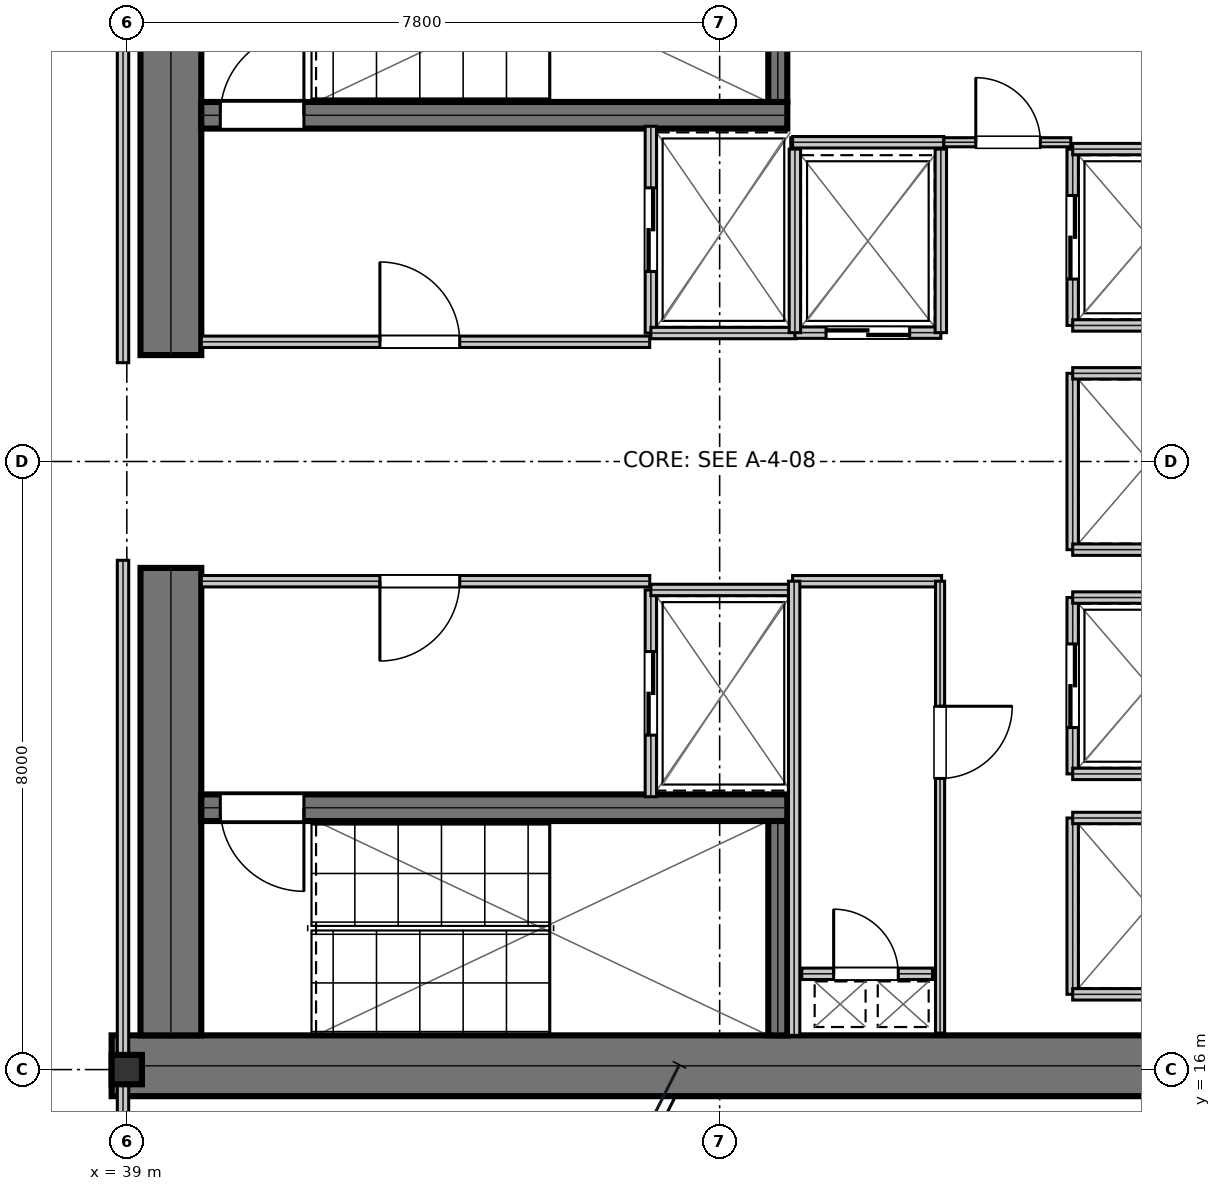
"""IFC4 building model, lengths in metres.
Left out: names, types, materials, properties, quantities, classifications, styles, units other than length and angle.
Written with IfcOpenShell. Run it as: python <this file> out.ifc"""

import sys

from ifc_helpers import new_model, si_unit, direction, frame, frame_2d, origin, origin_2d, place, context, subcontext, project, spatial, rectangle, i_section, extrude, element, fill, save


model = new_model("IFC4")
c1 = context("Model", 3, precision=1e-05, world=origin(), true_north=direction((0.0, 1.0)))
c2 = subcontext(c1, "Body", "Model", "MODEL_VIEW")
j1 = project(units=[si_unit("LENGTHUNIT", "METRE"), si_unit("PLANEANGLEUNIT", "RADIAN")], contexts=[c1])
p1 = place(None, origin())
s1 = spatial("IfcSite", under=j1, at=p1, CompositionType="ELEMENT")
p2 = place(p1, origin())
s2 = spatial("IfcBuilding", under=s1, at=p2, CompositionType="ELEMENT")
p3 = place(p2, frame((0.0, 0.0, 137.1)))
s3 = spatial("IfcBuildingStorey", under=s2, at=p3, CompositionType="ELEMENT", Elevation=137.1)
p4 = place(p3, frame((38.8, 16.05, 0.0), z_axis=(0.0, 0.0, 1.0), x_axis=(1.0, 0.0, 0.0)))
e1 = element("IfcWall", 1, at=p4, inside=s3, PredefinedType="SHEAR", context=c2, shape_type="SweptSolid", body=[
    extrude(rectangle(XDim=16.0, YDim=0.8, at=frame_2d((8.0, 0.0))), origin(), (0.0, 0.0, 1.0), 3.81),
])
for number, where, z_axis, x_axis in (
    (2, (39.58, 16.45, 0.0), (0.0, 0.0, 1.0), (0.0, 1.0, 0.0)),
    (3, (39.58, 25.4, 0.0), (0.0, 0.0, 1.0), (0.0, 1.0, 0.0)),
):
    element("IfcWall", number, at=place(p3, frame(where, z_axis=z_axis, x_axis=x_axis)), inside=s3, PredefinedType="SHEAR", context=c2, shape_type="SweptSolid", body=[
        extrude(rectangle(XDim=6.15, YDim=0.8, at=frame_2d((3.075, 0.0))), origin(), (0.0, 0.0, 1.0), 3.81),
    ])
p5 = place(p3, frame((39.98, 28.555, 0.0), z_axis=(0.0, 0.0, 1.0), x_axis=(1.0, 0.0, 0.0)))
e4 = element("IfcWall", 4, at=p5, inside=s3, PredefinedType="SHEAR", context=c2, shape_type="SweptSolid", body=[
    extrude(rectangle(XDim=7.71, YDim=0.35, at=frame_2d((3.855, 0.0))), origin(), (0.0, 0.0, 1.0), 3.81),
])
p6 = place(p5, frame((0.25, 0.0, 0.0)))
e5 = element("IfcOpeningElement", 5, at=p6, cuts=e4, PredefinedType="OPENING", context=c2, shape_type="SweptSolid", body=[
    extrude(rectangle(XDim=1.1, YDim=2.15, at=frame_2d((0.55, 1.075))), frame((0.0, 0.185, 0.0), z_axis=(0.0, -1.0, 0.0), x_axis=(1.0, 0.0, 0.0)), (0.0, 0.0, 1.0), 0.37),
])
p7 = place(p3, frame((39.98, 19.445, 0.0), z_axis=(0.0, 0.0, 1.0), x_axis=(1.0, 0.0, 0.0)))
e6 = element("IfcWall", 6, at=p7, inside=s3, PredefinedType="SHEAR", context=c2, shape_type="SweptSolid", body=[
    extrude(rectangle(XDim=7.71, YDim=0.35, at=frame_2d((3.855, 0.0))), origin(), (0.0, 0.0, 1.0), 3.81),
])
p8 = place(p7, frame((0.25, 0.0, 0.0)))
e7 = element("IfcOpeningElement", 7, at=p8, cuts=e6, PredefinedType="OPENING", context=c2, shape_type="SweptSolid", body=[
    extrude(rectangle(XDim=1.1, YDim=2.15, at=frame_2d((0.55, 1.075))), frame((0.0, 0.185, 0.0), z_axis=(0.0, -1.0, 0.0), x_axis=(1.0, 0.0, 0.0)), (0.0, 0.0, 1.0), 0.37),
])
for number, where, z_axis, x_axis in (
    (8, (47.565, 28.73, 0.0), (0.0, 0.0, 1.0), (0.0, 1.0, 0.0)),
    (9, (47.565, 16.45, 0.0), (0.0, 0.0, 1.0), (0.0, 1.0, 0.0)),
):
    element("IfcWall", number, at=place(p3, frame(where, z_axis=z_axis, x_axis=x_axis)), inside=s3, PredefinedType="SHEAR", context=c2, shape_type="SweptSolid", body=[
        extrude(rectangle(XDim=2.82, YDim=0.25, at=frame_2d((1.41, 0.0))), origin(), (0.0, 0.0, 1.0), 3.81),
    ])
p9 = place(p3, frame((39.0, 16.0, 0.0), z_axis=(0.0, 0.0, 1.0), x_axis=(1.0, 0.0, 0.0)))
e10 = element("IfcColumn", 10, at=p9, inside=s3, PredefinedType="COLUMN", context=c2, shape_type="SweptSolid", body=[
    extrude(i_section(OverallWidth=0.398, OverallDepth=0.387, WebThickness=0.021, FlangeThickness=0.033, at=origin_2d()), origin(), (0.0, 0.0, 1.0), 4.044),
])
p10 = place(p3, frame((39.98, 25.575, 0.0), z_axis=(0.0, 0.0, 1.0), x_axis=(1.0, 0.0, 0.0)))
e11 = element("IfcWall", 11, at=p10, inside=s3, PredefinedType="PARTITIONING", context=c2, shape_type="SweptSolid", body=[
    extrude(rectangle(XDim=5.9, YDim=0.15, at=frame_2d((2.95, 0.0))), origin(), (0.0, 0.0, 1.0), 3.81),
])
p11 = place(p10, frame((2.35, 0.0, 0.0)))
e12 = element("IfcOpeningElement", 12, at=p11, cuts=e11, PredefinedType="OPENING", context=c2, shape_type="SweptSolid", body=[
    extrude(rectangle(XDim=1.05, YDim=2.15, at=frame_2d((0.525, 1.075))), frame((0.0, 0.085, 0.0), z_axis=(0.0, -1.0, 0.0), x_axis=(1.0, 0.0, 0.0)), (0.0, 0.0, 1.0), 0.17),
])
p12 = place(p3, frame((39.98, 22.425, 0.0), z_axis=(0.0, 0.0, 1.0), x_axis=(1.0, 0.0, 0.0)))
e13 = element("IfcWall", 13, at=p12, inside=s3, PredefinedType="PARTITIONING", context=c2, shape_type="SweptSolid", body=[
    extrude(rectangle(XDim=5.9, YDim=0.15, at=frame_2d((2.95, 0.0))), origin(), (0.0, 0.0, 1.0), 3.81),
])
p13 = place(p12, frame((2.35, 0.0, 0.0)))
e14 = element("IfcOpeningElement", 14, at=p13, cuts=e13, PredefinedType="OPENING", context=c2, shape_type="SweptSolid", body=[
    extrude(rectangle(XDim=1.05, YDim=2.15, at=frame_2d((0.525, 1.075))), frame((0.0, 0.085, 0.0), z_axis=(0.0, -1.0, 0.0), x_axis=(1.0, 0.0, 0.0)), (0.0, 0.0, 1.0), 0.17),
])
p14 = place(p3, frame((45.895, 25.69, 0.0), z_axis=(0.0, 0.0, 1.0), x_axis=(0.0, 1.0, 0.0)))
e15 = element("IfcWall", 15, at=p14, inside=s3, PredefinedType="PARTITIONING", context=c2, shape_type="SweptSolid", body=[
    extrude(rectangle(XDim=2.72, YDim=0.15, at=frame_2d((1.36, 0.0))), origin(), (0.0, 0.0, 1.0), 3.81),
])
p15 = place(p14, frame((0.81, 0.0, 0.0)))
e16 = element("IfcOpeningElement", 16, at=p15, cuts=e15, PredefinedType="OPENING", context=c2, shape_type="SweptSolid", body=[
    extrude(rectangle(XDim=1.1, YDim=2.15, at=frame_2d((0.55, 1.075))), frame((0.0, 0.085, 0.0), z_axis=(0.0, -1.0, 0.0), x_axis=(1.0, 0.0, 0.0)), (0.0, 0.0, 1.0), 0.17),
])
p16 = place(p3, frame((45.895, 25.69, 0.0), z_axis=(0.0, 0.0, 1.0), x_axis=(1.0, 0.0, 0.0)))
e17 = element("IfcWall", 17, at=p16, inside=s3, PredefinedType="PARTITIONING", context=c2, shape_type="SweptSolid", body=[
    extrude(rectangle(XDim=1.915, YDim=0.15, at=frame_2d((0.958, 0.0))), origin(), (0.0, 0.0, 1.0), 3.81),
])
p17 = place(p3, frame((45.895, 19.59, 0.0), z_axis=(0.0, 0.0, 1.0), x_axis=(0.0, 1.0, 0.0)))
e18 = element("IfcWall", 18, at=p17, inside=s3, PredefinedType="PARTITIONING", context=c2, shape_type="SweptSolid", body=[
    extrude(rectangle(XDim=2.72, YDim=0.15, at=frame_2d((1.36, 0.0))), origin(), (0.0, 0.0, 1.0), 3.81),
])
p18 = place(p17, frame((0.81, 0.0, 0.0)))
e19 = element("IfcOpeningElement", 19, at=p18, cuts=e18, PredefinedType="OPENING", context=c2, shape_type="SweptSolid", body=[
    extrude(rectangle(XDim=1.1, YDim=2.15, at=frame_2d((0.55, 1.075))), frame((0.0, 0.085, 0.0), z_axis=(0.0, -1.0, 0.0), x_axis=(1.0, 0.0, 0.0)), (0.0, 0.0, 1.0), 0.17),
])
p19 = place(p3, frame((45.895, 22.31, 0.0), z_axis=(0.0, 0.0, 1.0), x_axis=(1.0, 0.0, 0.0)))
e20 = element("IfcWall", 20, at=p19, inside=s3, PredefinedType="PARTITIONING", context=c2, shape_type="SweptSolid", body=[
    extrude(rectangle(XDim=1.915, YDim=0.15, at=frame_2d((0.958, 0.0))), origin(), (0.0, 0.0, 1.0), 3.81),
])
p20 = place(p3, frame((47.79, 25.695, 0.0), z_axis=(0.0, 0.0, 1.0), x_axis=(1.0, 0.0, 0.0)))
e21 = element("IfcWall", 21, at=p20, inside=s3, PredefinedType="PARTITIONING", context=c2, shape_type="SweptSolid", body=[
    extrude(rectangle(XDim=1.92, YDim=0.15, at=frame_2d((0.96, 0.0))), origin(), (0.0, 0.0, 1.0), 3.81),
])
p21 = place(p20, frame((0.41, 0.0, 0.0)))
e22 = element("IfcOpeningElement", 22, at=p21, cuts=e21, PredefinedType="OPENING", context=c2, shape_type="SweptSolid", body=[
    extrude(rectangle(XDim=1.1, YDim=2.15, at=frame_2d((0.55, 1.075))), frame((0.0, 0.085, 0.0), z_axis=(0.0, -1.0, 0.0), x_axis=(1.0, 0.0, 0.0)), (0.0, 0.0, 1.0), 0.17),
])
for number, where, z_axis, x_axis in (
    (23, (47.79, 25.695, 0.0), (0.0, 0.0, 1.0), (0.0, 1.0, 0.0)),
    (24, (49.71, 25.695, 0.0), (0.0, 0.0, 1.0), (0.0, 1.0, 0.0)),
):
    element("IfcWall", number, at=place(p3, frame(where, z_axis=z_axis, x_axis=x_axis)), inside=s3, PredefinedType="PARTITIONING", context=c2, shape_type="SweptSolid", body=[
        extrude(rectangle(XDim=2.415, YDim=0.15, at=frame_2d((1.208, 0.0))), origin(), (0.0, 0.0, 1.0), 3.81),
    ])
p22 = place(p3, frame((51.445, 25.79, 0.0), z_axis=(0.0, 0.0, 1.0), x_axis=(0.0, 1.0, 0.0)))
e25 = element("IfcWall", 25, at=p22, inside=s3, PredefinedType="PARTITIONING", context=c2, shape_type="SweptSolid", body=[
    extrude(rectangle(XDim=2.32, YDim=0.15, at=frame_2d((1.16, 0.0))), origin(), (0.0, 0.0, 1.0), 3.81),
])
p23 = place(p22, frame((0.61, 0.0, 0.0)))
e26 = element("IfcOpeningElement", 26, at=p23, cuts=e25, PredefinedType="OPENING", context=c2, shape_type="SweptSolid", body=[
    extrude(rectangle(XDim=1.1, YDim=2.15, at=frame_2d((0.55, 1.075))), frame((0.0, 0.085, 0.0), z_axis=(0.0, -1.0, 0.0), x_axis=(1.0, 0.0, 0.0)), (0.0, 0.0, 1.0), 0.17),
])
for number, where, z_axis, x_axis in (
    (27, (51.445, 25.79, 0.0), (0.0, 0.0, 1.0), (1.0, 0.0, 0.0)),
    (28, (51.445, 28.11, 0.0), (0.0, 0.0, 1.0), (1.0, 0.0, 0.0)),
):
    element("IfcWall", number, at=place(p3, frame(where, z_axis=z_axis, x_axis=x_axis)), inside=s3, PredefinedType="PARTITIONING", context=c2, shape_type="SweptSolid", body=[
        extrude(rectangle(XDim=2.015, YDim=0.15, at=frame_2d((1.007, 0.0))), origin(), (0.0, 0.0, 1.0), 3.81),
    ])
p24 = place(p3, frame((51.445, 19.89, 0.0), z_axis=(0.0, 0.0, 1.0), x_axis=(0.0, 1.0, 0.0)))
e29 = element("IfcWall", 29, at=p24, inside=s3, PredefinedType="PARTITIONING", context=c2, shape_type="SweptSolid", body=[
    extrude(rectangle(XDim=2.32, YDim=0.15, at=frame_2d((1.16, 0.0))), origin(), (0.0, 0.0, 1.0), 3.81),
])
p25 = place(p24, frame((0.61, 0.0, 0.0)))
e30 = element("IfcOpeningElement", 30, at=p25, cuts=e29, PredefinedType="OPENING", context=c2, shape_type="SweptSolid", body=[
    extrude(rectangle(XDim=1.1, YDim=2.15, at=frame_2d((0.55, 1.075))), frame((0.0, 0.085, 0.0), z_axis=(0.0, -1.0, 0.0), x_axis=(1.0, 0.0, 0.0)), (0.0, 0.0, 1.0), 0.17),
])
for number, where, z_axis, x_axis in (
    (31, (51.445, 19.89, 0.0), (0.0, 0.0, 1.0), (1.0, 0.0, 0.0)),
    (32, (51.445, 22.21, 0.0), (0.0, 0.0, 1.0), (1.0, 0.0, 0.0)),
):
    element("IfcWall", number, at=place(p3, frame(where, z_axis=z_axis, x_axis=x_axis)), inside=s3, PredefinedType="PARTITIONING", context=c2, shape_type="SweptSolid", body=[
        extrude(rectangle(XDim=2.015, YDim=0.15, at=frame_2d((1.007, 0.0))), origin(), (0.0, 0.0, 1.0), 3.81),
    ])
p26 = place(p3, frame((51.445, 22.84, 0.0), z_axis=(0.0, 0.0, 1.0), x_axis=(0.0, 1.0, 0.0)))
e33 = element("IfcWall", 33, at=p26, inside=s3, PredefinedType="PARTITIONING", context=c2, shape_type="SweptSolid", body=[
    extrude(rectangle(XDim=2.32, YDim=0.15, at=frame_2d((1.16, 0.0))), origin(), (0.0, 0.0, 1.0), 3.81),
])
for number, where, z_axis, x_axis in (
    (34, (51.445, 22.84, 0.0), (0.0, 0.0, 1.0), (1.0, 0.0, 0.0)),
    (35, (51.445, 25.16, 0.0), (0.0, 0.0, 1.0), (1.0, 0.0, 0.0)),
):
    element("IfcWall", number, at=place(p3, frame(where, z_axis=z_axis, x_axis=x_axis)), inside=s3, PredefinedType="PARTITIONING", context=c2, shape_type="SweptSolid", body=[
        extrude(rectangle(XDim=2.015, YDim=0.15, at=frame_2d((1.007, 0.0))), origin(), (0.0, 0.0, 1.0), 3.81),
    ])
p27 = place(p3, frame((51.445, 16.99, 0.0), z_axis=(0.0, 0.0, 1.0), x_axis=(0.0, 1.0, 0.0)))
e36 = element("IfcWall", 36, at=p27, inside=s3, PredefinedType="PARTITIONING", context=c2, shape_type="SweptSolid", body=[
    extrude(rectangle(XDim=2.32, YDim=0.15, at=frame_2d((1.16, 0.0))), origin(), (0.0, 0.0, 1.0), 3.81),
])
for number, where, z_axis, x_axis in (
    (37, (51.445, 16.99, 0.0), (0.0, 0.0, 1.0), (1.0, 0.0, 0.0)),
    (38, (51.445, 19.31, 0.0), (0.0, 0.0, 1.0), (1.0, 0.0, 0.0)),
):
    element("IfcWall", number, at=place(p3, frame(where, z_axis=z_axis, x_axis=x_axis)), inside=s3, PredefinedType="PARTITIONING", context=c2, shape_type="SweptSolid", body=[
        extrude(rectangle(XDim=2.015, YDim=0.15, at=frame_2d((1.007, 0.0))), origin(), (0.0, 0.0, 1.0), 3.81),
    ])
p28 = place(p3, frame((47.88, 17.26, 0.0), z_axis=(0.0, 0.0, 1.0), x_axis=(1.0, 0.0, 0.0)))
e39 = element("IfcWall", 39, at=p28, inside=s3, PredefinedType="PARTITIONING", context=c2, shape_type="SweptSolid", body=[
    extrude(rectangle(XDim=1.72, YDim=0.15, at=frame_2d((0.86, 0.0))), origin(), (0.0, 0.0, 1.0), 3.81),
])
p29 = place(p28, frame((0.42, 0.0, 0.0)))
e40 = element("IfcOpeningElement", 40, at=p29, cuts=e39, PredefinedType="OPENING", context=c2, shape_type="SweptSolid", body=[
    extrude(rectangle(XDim=0.85, YDim=2.15, at=frame_2d((0.425, 1.075))), frame((0.0, 0.085, 0.0), z_axis=(0.0, -1.0, 0.0), x_axis=(1.0, 0.0, 0.0)), (0.0, 0.0, 1.0), 0.17),
])
p30 = place(p3, frame((47.76, 22.425, 0.0), z_axis=(0.0, 0.0, 1.0), x_axis=(1.0, 0.0, 0.0)))
e41 = element("IfcWall", 41, at=p30, inside=s3, PredefinedType="PARTITIONING", context=c2, shape_type="SweptSolid", body=[
    extrude(rectangle(XDim=1.96, YDim=0.15, at=frame_2d((0.98, 0.0))), origin(), (0.0, 0.0, 1.0), 3.81),
])
p31 = place(p3, frame((47.78, 16.45, 0.0), z_axis=(0.0, 0.0, 1.0), x_axis=(0.0, 1.0, 0.0)))
e42 = element("IfcWall", 42, at=p31, inside=s3, PredefinedType="PARTITIONING", context=c2, shape_type="SweptSolid", body=[
    extrude(rectangle(XDim=5.975, YDim=0.15, at=frame_2d((2.988, 0.0))), origin(), (0.0, 0.0, 1.0), 3.81),
])
p32 = place(p3, frame((49.7, 16.48, 0.0), z_axis=(0.0, 0.0, 1.0), x_axis=(0.0, 1.0, 0.0)))
e43 = element("IfcWall", 43, at=p32, inside=s3, PredefinedType="PARTITIONING", context=c2, shape_type="SweptSolid", body=[
    extrude(rectangle(XDim=5.945, YDim=0.12, at=frame_2d((2.973, 0.0))), origin(), (0.0, 0.0, 1.0), 3.81),
])
p33 = place(p32, frame((3.35, 0.0, 0.0)))
e44 = element("IfcOpeningElement", 44, at=p33, cuts=e43, PredefinedType="OPENING", context=c2, shape_type="SweptSolid", body=[
    extrude(rectangle(XDim=0.95, YDim=2.15, at=frame_2d((0.475, 1.075))), frame((0.0, 0.07, 0.0), z_axis=(0.0, -1.0, 0.0), x_axis=(1.0, 0.0, 0.0)), (0.0, 0.0, 1.0), 0.14),
])
p34 = place(p3, frame((47.76, 28.2, 0.0), z_axis=(0.0, 0.0, 1.0), x_axis=(1.0, 0.0, 0.0)))
e45 = element("IfcWall", 45, at=p34, inside=s3, PredefinedType="PARTITIONING", context=c2, shape_type="SweptSolid", body=[
    extrude(rectangle(XDim=1.99, YDim=0.15, at=frame_2d((0.995, 0.0))), origin(), (0.0, 0.0, 1.0), 3.81),
])
p35 = place(p3, frame((49.75, 28.2, 0.0), z_axis=(0.0, 0.0, 1.0), x_axis=(1.0, 0.0, 0.0)))
e46 = element("IfcWall", 46, at=p35, inside=s3, PredefinedType="PARTITIONING", context=c2, shape_type="SweptSolid", body=[
    extrude(rectangle(XDim=1.67, YDim=0.12, at=frame_2d((0.835, 0.0))), origin(), (0.0, 0.0, 1.0), 3.81),
])
p36 = place(p35, frame((0.42, 0.0, 0.0)))
e47 = element("IfcOpeningElement", 47, at=p36, cuts=e46, PredefinedType="OPENING", context=c2, shape_type="SweptSolid", body=[
    extrude(rectangle(XDim=0.85, YDim=2.15, at=frame_2d((0.425, 1.075))), frame((0.0, 0.07, 0.0), z_axis=(0.0, -1.0, 0.0), x_axis=(1.0, 0.0, 0.0)), (0.0, 0.0, 1.0), 0.14),
])
for number, where, z_axis, x_axis in (
    (48, (38.95, 14.5, 0.0), (0.0, 0.0, 1.0), (0.0, 1.0, 0.0)),
    (49, (38.95, 25.3, 0.0), (0.0, 0.0, 1.0), (0.0, 1.0, 0.0)),
):
    element("IfcWall", number, at=place(p3, frame(where, z_axis=z_axis, x_axis=x_axis)), inside=s3, PredefinedType="PARTITIONING", context=c2, shape_type="SweptSolid", body=[
        extrude(rectangle(XDim=8.2, YDim=0.15, at=frame_2d((4.1, 0.0))), origin(), (0.0, 0.0, 1.0), 3.19),
    ])
p37 = place(p11, origin())
e50 = element("IfcDoor", 50, at=p37, inside=s3, OperationType="SINGLE_SWING_LEFT", PredefinedType="DOOR", context=c2, shape_type="SweptSolid", body=[
    extrude(rectangle(XDim=1.05, YDim=2.15, at=frame_2d((0.525, 1.075))), frame((0.0, 0.025, 0.0), z_axis=(0.0, -1.0, 0.0), x_axis=(1.0, 0.0, 0.0)), (0.0, 0.0, 1.0), 0.05),
])
fill(e12, e50)
p38 = place(p13, frame((1.05, 0.0, 0.0), z_axis=(0.0, 0.0, 1.0), x_axis=(-1.0, 0.0, 0.0)))
e51 = element("IfcDoor", 51, at=p38, inside=s3, OperationType="SINGLE_SWING_RIGHT", PredefinedType="DOOR", context=c2, shape_type="SweptSolid", body=[
    extrude(rectangle(XDim=1.05, YDim=2.15, at=frame_2d((0.525, 1.075))), frame((0.0, 0.025, 0.0), z_axis=(0.0, -1.0, 0.0), x_axis=(1.0, 0.0, 0.0)), (0.0, 0.0, 1.0), 0.05),
])
fill(e14, e51)
p39 = place(p15, frame((1.1, 0.0, 0.0), z_axis=(0.0, 0.0, 1.0), x_axis=(-1.0, 0.0, 0.0)))
e52 = element("IfcDoor", 52, at=p39, inside=s3, OperationType="DOUBLE_DOOR_SLIDING", PredefinedType="DOOR", context=c2, shape_type="SweptSolid", body=[
    extrude(rectangle(XDim=1.1, YDim=2.15, at=frame_2d((0.55, 1.075))), frame((0.0, 0.025, 0.0), z_axis=(0.0, -1.0, 0.0), x_axis=(1.0, 0.0, 0.0)), (0.0, 0.0, 1.0), 0.05),
])
fill(e16, e52)
p40 = place(p18, frame((1.1, 0.0, 0.0), z_axis=(0.0, 0.0, 1.0), x_axis=(-1.0, 0.0, 0.0)))
e53 = element("IfcDoor", 53, at=p40, inside=s3, OperationType="DOUBLE_DOOR_SLIDING", PredefinedType="DOOR", context=c2, shape_type="SweptSolid", body=[
    extrude(rectangle(XDim=1.1, YDim=2.15, at=frame_2d((0.55, 1.075))), frame((0.0, 0.025, 0.0), z_axis=(0.0, -1.0, 0.0), x_axis=(1.0, 0.0, 0.0)), (0.0, 0.0, 1.0), 0.05),
])
fill(e19, e53)
p41 = place(p21, frame((1.1, 0.0, 0.0), z_axis=(0.0, 0.0, 1.0), x_axis=(-1.0, 0.0, 0.0)))
e54 = element("IfcDoor", 54, at=p41, inside=s3, OperationType="DOUBLE_DOOR_SLIDING", PredefinedType="DOOR", context=c2, shape_type="SweptSolid", body=[
    extrude(rectangle(XDim=1.1, YDim=2.15, at=frame_2d((0.55, 1.075))), frame((0.0, 0.025, 0.0), z_axis=(0.0, -1.0, 0.0), x_axis=(1.0, 0.0, 0.0)), (0.0, 0.0, 1.0), 0.05),
])
fill(e22, e54)
p42 = place(p23, frame((1.1, 0.0, 0.0), z_axis=(0.0, 0.0, 1.0), x_axis=(-1.0, 0.0, 0.0)))
e55 = element("IfcDoor", 55, at=p42, inside=s3, OperationType="DOUBLE_DOOR_SLIDING", PredefinedType="DOOR", context=c2, shape_type="SweptSolid", body=[
    extrude(rectangle(XDim=1.1, YDim=2.15, at=frame_2d((0.55, 1.075))), frame((0.0, 0.025, 0.0), z_axis=(0.0, -1.0, 0.0), x_axis=(1.0, 0.0, 0.0)), (0.0, 0.0, 1.0), 0.05),
])
fill(e26, e55)
p43 = place(p25, frame((1.1, 0.0, 0.0), z_axis=(0.0, 0.0, 1.0), x_axis=(-1.0, 0.0, 0.0)))
e56 = element("IfcDoor", 56, at=p43, inside=s3, OperationType="DOUBLE_DOOR_SLIDING", PredefinedType="DOOR", context=c2, shape_type="SweptSolid", body=[
    extrude(rectangle(XDim=1.1, YDim=2.15, at=frame_2d((0.55, 1.075))), frame((0.0, 0.025, 0.0), z_axis=(0.0, -1.0, 0.0), x_axis=(1.0, 0.0, 0.0)), (0.0, 0.0, 1.0), 0.05),
])
fill(e30, e56)
p44 = place(p29, origin())
e57 = element("IfcDoor", 57, at=p44, inside=s3, OperationType="SINGLE_SWING_LEFT", PredefinedType="TRAPDOOR", context=c2, shape_type="SweptSolid", body=[
    extrude(rectangle(XDim=0.85, YDim=2.15, at=frame_2d((0.425, 1.075))), frame((0.0, 0.025, 0.0), z_axis=(0.0, -1.0, 0.0), x_axis=(1.0, 0.0, 0.0)), (0.0, 0.0, 1.0), 0.05),
])
fill(e40, e57)
p45 = place(p33, frame((0.95, 0.0, 0.0), z_axis=(0.0, 0.0, 1.0), x_axis=(-1.0, 0.0, 0.0)))
e58 = element("IfcDoor", 58, at=p45, inside=s3, OperationType="SINGLE_SWING_LEFT", PredefinedType="DOOR", context=c2, shape_type="SweptSolid", body=[
    extrude(rectangle(XDim=0.95, YDim=2.15, at=frame_2d((0.475, 1.075))), frame((0.0, 0.025, 0.0), z_axis=(0.0, -1.0, 0.0), x_axis=(1.0, 0.0, 0.0)), (0.0, 0.0, 1.0), 0.05),
])
fill(e44, e58)
p46 = place(p36, origin())
e59 = element("IfcDoor", 59, at=p46, inside=s3, OperationType="SINGLE_SWING_LEFT", PredefinedType="DOOR", context=c2, shape_type="SweptSolid", body=[
    extrude(rectangle(XDim=0.85, YDim=2.15, at=frame_2d((0.425, 1.075))), frame((0.0, 0.025, 0.0), z_axis=(0.0, -1.0, 0.0), x_axis=(1.0, 0.0, 0.0)), (0.0, 0.0, 1.0), 0.05),
])
fill(e47, e59)
p47 = place(p6, origin())
e60 = element("IfcDoor", 60, at=p47, inside=s3, OperationType="SINGLE_SWING_RIGHT", PredefinedType="DOOR", context=c2, shape_type="SweptSolid", body=[
    extrude(rectangle(XDim=1.1, YDim=2.15, at=frame_2d((0.55, 1.075))), frame((0.0, 0.025, 0.0), z_axis=(0.0, -1.0, 0.0), x_axis=(1.0, 0.0, 0.0)), (0.0, 0.0, 1.0), 0.05),
])
fill(e5, e60)
p48 = place(p8, frame((1.1, 0.0, 0.0), z_axis=(0.0, 0.0, 1.0), x_axis=(-1.0, 0.0, 0.0)))
e61 = element("IfcDoor", 61, at=p48, inside=s3, OperationType="SINGLE_SWING_LEFT", PredefinedType="DOOR", context=c2, shape_type="SweptSolid", body=[
    extrude(rectangle(XDim=1.1, YDim=2.15, at=frame_2d((0.55, 1.075))), frame((0.0, 0.025, 0.0), z_axis=(0.0, -1.0, 0.0), x_axis=(1.0, 0.0, 0.0)), (0.0, 0.0, 1.0), 0.05),
])
fill(e7, e61)
save(model, sys.argv[1])
